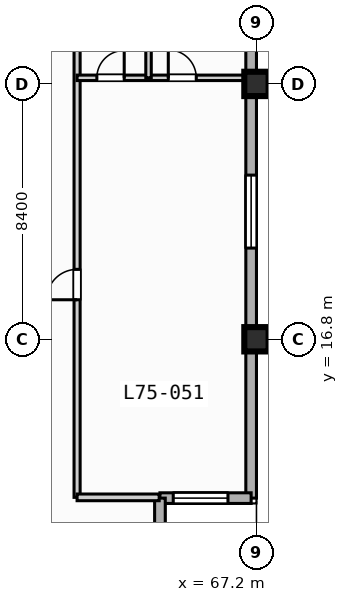
"""IFC4 building model, lengths in metres.
Left out: names, types, materials, properties, quantities, classifications, styles, units other than length and angle.
Written with IfcOpenShell. Run it as: python <this file> out.ifc"""

import sys

from ifc_helpers import new_model, si_unit, direction, frame, frame_2d, origin, origin_2d, place, context, subcontext, project, spatial, rectangle, extrude, element, fill, save


model = new_model("IFC4")
c1 = context("Model", 3, precision=1e-05, world=origin(), true_north=direction((0.0, 1.0)))
c2 = subcontext(c1, "Body", "Model", "MODEL_VIEW")
j1 = project(units=[si_unit("LENGTHUNIT", "METRE"), si_unit("PLANEANGLEUNIT", "RADIAN")], contexts=[c1])
p1 = place(None, origin())
s1 = spatial("IfcSite", under=j1, at=p1, CompositionType="ELEMENT")
p2 = place(p1, origin())
s2 = spatial("IfcBuilding", under=s1, at=p2, CompositionType="ELEMENT")
p3 = place(p2, frame((0.0, 0.0, 304.7)))
s3 = spatial("IfcBuildingStorey", under=s2, at=p3, CompositionType="ELEMENT", Elevation=304.7)
for number, where, z_axis, x_axis in (
    (1, (67.2, 16.8, 0.0), (0.0, 0.0, 1.0), (1.0, 0.0, 0.0)),
    (2, (67.2, 25.2, 0.0), (0.0, 0.0, 1.0), (1.0, 0.0, 0.0)),
):
    element("IfcColumn", number, at=place(p3, frame(where, z_axis=z_axis, x_axis=x_axis)), inside=s3, PredefinedType="COLUMN", context=c2, shape_type="SweptSolid", body=[
        extrude(rectangle(XDim=0.8, YDim=0.8, at=origin_2d()), origin(), (0.0, 0.0, 1.0), 3.9),
    ])
p4 = place(p3, frame((67.025, 30.425, 0.0), z_axis=(0.0, 0.0, 1.0), x_axis=(0.0, -1.0, 0.0)))
e3 = element("IfcWall", 3, at=p4, inside=s3, PredefinedType="STANDARD", context=c2, shape_type="SweptSolid", body=[
    extrude(rectangle(XDim=18.85, YDim=0.35, at=frame_2d((9.425, 0.0))), origin(), (0.0, 0.0, 1.0), 3.67),
])
p5 = place(p4, frame((8.225, 0.0, 0.85)))
e4 = element("IfcOpeningElement", 4, at=p5, cuts=e3, PredefinedType="OPENING", context=c2, shape_type="SweptSolid", body=[
    extrude(rectangle(XDim=2.4, YDim=1.95, at=frame_2d((1.2, 0.975))), frame((0.0, 0.185, 0.0), z_axis=(0.0, -1.0, 0.0), x_axis=(1.0, 0.0, 0.0)), (0.0, 0.0, 1.0), 0.37),
])
p6 = place(p3, frame((67.025, 11.575, 0.0), z_axis=(0.0, 0.0, 1.0), x_axis=(-1.0, 0.0, 0.0)))
e5 = element("IfcWall", 5, at=p6, inside=s3, PredefinedType="STANDARD", context=c2, shape_type="SweptSolid", body=[
    extrude(rectangle(XDim=3.0, YDim=0.35, at=frame_2d((1.5, 0.0))), origin(), (0.0, 0.0, 1.0), 3.67),
])
p7 = place(p6, frame((0.762, 0.0, 0.85)))
e6 = element("IfcOpeningElement", 6, at=p7, cuts=e5, PredefinedType="OPENING", context=c2, shape_type="SweptSolid", body=[
    extrude(rectangle(XDim=1.8, YDim=1.8, at=frame_2d((0.9, 0.9))), frame((0.0, 0.185, 0.0), z_axis=(0.0, -1.0, 0.0), x_axis=(1.0, 0.0, 0.0)), (0.0, 0.0, 1.0), 0.37),
])
p8 = place(p3, frame((64.025, 11.575, 0.0), z_axis=(0.0, 0.0, 1.0), x_axis=(0.0, -1.0, 0.0)))
e7 = element("IfcWall", 7, at=p8, inside=s3, PredefinedType="STANDARD", context=c2, shape_type="SweptSolid", body=[
    extrude(rectangle(XDim=3.0, YDim=0.35, at=frame_2d((1.5, 0.0))), origin(), (0.0, 0.0, 1.0), 3.67),
])
p9 = place(p3, frame((61.3, 11.6, 0.0), z_axis=(0.0, 0.0, 1.0), x_axis=(0.0, 1.0, 0.0)))
e8 = element("IfcWall", 8, at=p9, inside=s3, PredefinedType="PARTITIONING", context=c2, shape_type="SweptSolid", body=[
    extrude(rectangle(XDim=18.8, YDim=0.2, at=frame_2d((9.4, 0.0))), origin(), (0.0, 0.0, 1.0), 3.67),
])
p10 = place(p9, frame((6.5, 0.0, 0.0)))
e9 = element("IfcOpeningElement", 9, at=p10, cuts=e8, PredefinedType="OPENING", context=c2, shape_type="SweptSolid", body=[
    extrude(rectangle(XDim=1.0, YDim=2.15, at=frame_2d((0.5, 1.075))), frame((0.0, 0.11, 0.0), z_axis=(0.0, -1.0, 0.0), x_axis=(1.0, 0.0, 0.0)), (0.0, 0.0, 1.0), 0.22),
])
p11 = place(p3, frame((61.3, 25.4, 0.0), z_axis=(0.0, 0.0, 1.0), x_axis=(1.0, 0.0, 0.0)))
e10 = element("IfcWall", 10, at=p11, inside=s3, PredefinedType="PLUMBINGWALL", context=c2, shape_type="SweptSolid", body=[
    extrude(rectangle(XDim=5.5, YDim=0.18, at=frame_2d((2.75, 0.0))), origin(), (0.0, 0.0, 1.0), 3.127),
])
p12 = place(p11, frame((0.65, 0.0, 0.0)))
e11 = element("IfcOpeningElement", 11, at=p12, cuts=e10, PredefinedType="OPENING", context=c2, shape_type="SweptSolid", body=[
    extrude(rectangle(XDim=0.9, YDim=2.1, at=frame_2d((0.45, 1.05))), frame((0.0, 0.1, 0.0), z_axis=(0.0, -1.0, 0.0), x_axis=(1.0, 0.0, 0.0)), (0.0, 0.0, 1.0), 0.2),
])
p13 = place(p11, frame((3.0, 0.0, 0.0)))
e12 = element("IfcOpeningElement", 12, at=p13, cuts=e10, PredefinedType="OPENING", context=c2, shape_type="SweptSolid", body=[
    extrude(rectangle(XDim=0.92, YDim=2.1, at=frame_2d((0.46, 1.05))), frame((0.0, 0.1, 0.0), z_axis=(0.0, -1.0, 0.0), x_axis=(1.0, 0.0, 0.0)), (0.0, 0.0, 1.0), 0.2),
])
p14 = place(p3, frame((63.65, 25.4, 0.0), z_axis=(0.0, 0.0, 1.0), x_axis=(0.0, 1.0, 0.0)))
e13 = element("IfcWall", 13, at=p14, inside=s3, PredefinedType="PLUMBINGWALL", context=c2, shape_type="SweptSolid", body=[
    extrude(rectangle(XDim=5.0, YDim=0.18, at=frame_2d((2.5, 0.0))), origin(), (0.0, 0.0, 1.0), 3.67),
])
p15 = place(p3, frame((61.3, 11.6, 0.0), z_axis=(0.0, 0.0, 1.0), x_axis=(1.0, 0.0, 0.0)))
e14 = element("IfcWall", 14, at=p15, inside=s3, PredefinedType="PARTITIONING", context=c2, shape_type="SweptSolid", body=[
    extrude(rectangle(XDim=2.7, YDim=0.22, at=frame_2d((1.35, 0.0))), origin(), (0.0, 0.0, 1.0), 3.67),
])
p16 = place(p5, origin())
e15 = element("IfcWindow", 15, at=p16, inside=s3, PartitioningType="SINGLE_PANEL", PredefinedType="WINDOW", context=c2, shape_type="SweptSolid", body=[
    extrude(rectangle(XDim=2.4, YDim=1.95, at=frame_2d((1.2, 0.975))), frame((0.0, 0.03, 0.0), z_axis=(0.0, -1.0, 0.0), x_axis=(1.0, 0.0, 0.0)), (0.0, 0.0, 1.0), 0.06),
])
fill(e4, e15)
p17 = place(p7, origin())
e16 = element("IfcWindow", 16, at=p17, inside=s3, PartitioningType="SINGLE_PANEL", PredefinedType="WINDOW", context=c2, shape_type="SweptSolid", body=[
    extrude(rectangle(XDim=1.8, YDim=1.8, at=frame_2d((0.9, 0.9))), frame((0.0, 0.03, 0.0), z_axis=(0.0, -1.0, 0.0), x_axis=(1.0, 0.0, 0.0)), (0.0, 0.0, 1.0), 0.06),
])
fill(e6, e16)
p18 = place(p10, origin())
e17 = element("IfcDoor", 17, at=p18, inside=s3, OperationType="SINGLE_SWING_LEFT", PredefinedType="DOOR", context=c2, shape_type="SweptSolid", body=[
    extrude(rectangle(XDim=1.0, YDim=2.15, at=frame_2d((0.5, 1.075))), frame((0.0, 0.025, 0.0), z_axis=(0.0, -1.0, 0.0), x_axis=(1.0, 0.0, 0.0)), (0.0, 0.0, 1.0), 0.05),
])
fill(e9, e17)
p19 = place(p12, origin())
e18 = element("IfcDoor", 18, at=p19, inside=s3, OperationType="SINGLE_SWING_RIGHT", PredefinedType="DOOR", context=c2, shape_type="SweptSolid", body=[
    extrude(rectangle(XDim=0.9, YDim=2.1, at=frame_2d((0.45, 1.05))), frame((0.0, 0.025, 0.0), z_axis=(0.0, -1.0, 0.0), x_axis=(1.0, 0.0, 0.0)), (0.0, 0.0, 1.0), 0.05),
])
fill(e11, e18)
p20 = place(p13, origin())
e19 = element("IfcDoor", 19, at=p20, inside=s3, OperationType="SINGLE_SWING_LEFT", PredefinedType="DOOR", context=c2, shape_type="SweptSolid", body=[
    extrude(rectangle(XDim=0.92, YDim=2.1, at=frame_2d((0.46, 1.05))), frame((0.0, 0.025, 0.0), z_axis=(0.0, -1.0, 0.0), x_axis=(1.0, 0.0, 0.0)), (0.0, 0.0, 1.0), 0.05),
])
fill(e12, e19)
save(model, sys.argv[1])
